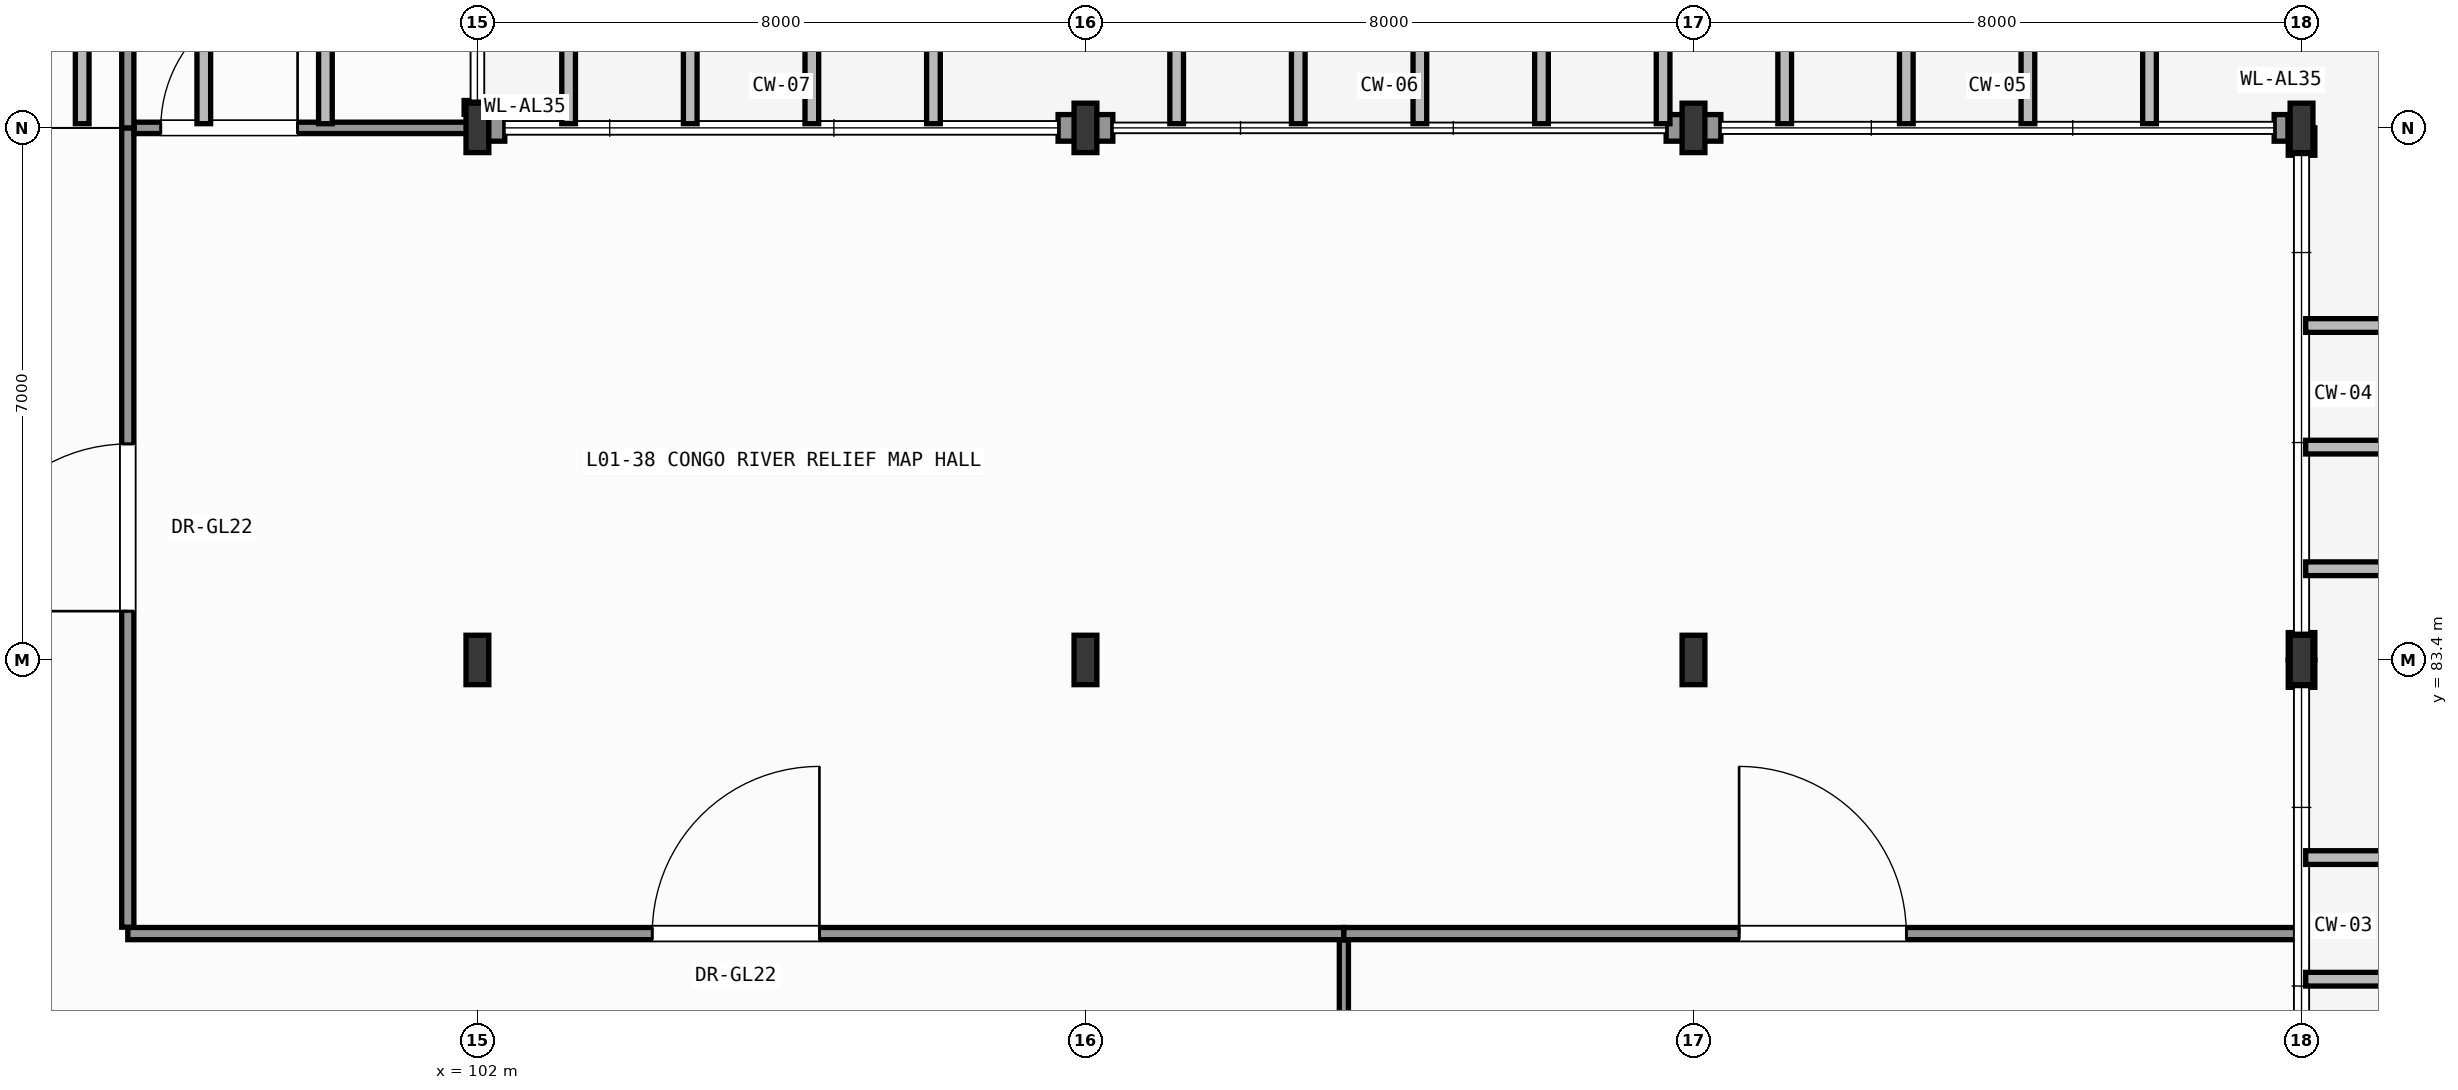
"""IFC4 building model, lengths in metres.
Left out: names, types, materials, properties, quantities, classifications, styles, units other than length and angle.
Written with IfcOpenShell. Run it as: python <this file> out.ifc"""

import sys

from ifc_helpers import new_model, si_unit, direction, frame, frame_2d, origin, origin_2d, place, context, subcontext, project, spatial, rectangle, i_section, extrude, element, fill, save


model = new_model("IFC4")
c1 = context("Model", 3, precision=1e-05, world=origin(), true_north=direction((0.0, 1.0)))
c2 = subcontext(c1, "Body", "Model", "MODEL_VIEW")
j1 = project(units=[si_unit("LENGTHUNIT", "METRE"), si_unit("PLANEANGLEUNIT", "RADIAN")], contexts=[c1])
p1 = place(None, origin())
s1 = spatial("IfcSite", under=j1, at=p1, CompositionType="ELEMENT")
p2 = place(p1, origin())
s2 = spatial("IfcBuilding", under=s1, at=p2, CompositionType="ELEMENT")
p3 = place(p2, origin())
s3 = spatial("IfcBuildingStorey", under=s2, at=p3, CompositionType="ELEMENT", Elevation=0.0)
for number, where, z_axis, x_axis in (
    (1, (102.0, 83.4, 0.0), (0.0, 0.0, 1.0), (1.0, 0.0, 0.0)),
    (2, (102.0, 90.4, 0.0), (0.0, 0.0, 1.0), (1.0, 0.0, 0.0)),
    (3, (110.0, 83.4, 0.0), (0.0, 0.0, 1.0), (1.0, 0.0, 0.0)),
    (4, (110.0, 90.4, 0.0), (0.0, 0.0, 1.0), (1.0, 0.0, 0.0)),
    (5, (118.0, 83.4, 0.0), (0.0, 0.0, 1.0), (1.0, 0.0, 0.0)),
    (6, (118.0, 90.4, 0.0), (0.0, 0.0, 1.0), (1.0, 0.0, 0.0)),
    (7, (126.0, 83.4, 0.0), (0.0, 0.0, 1.0), (1.0, 0.0, 0.0)),
    (8, (126.0, 90.4, 0.0), (0.0, 0.0, 1.0), (1.0, 0.0, 0.0)),
):
    element("IfcColumn", number, at=place(p3, frame(where, z_axis=z_axis, x_axis=x_axis)), inside=s3, PredefinedType="COLUMN", context=c2, shape_type="SweptSolid", body=[
        extrude(i_section(OverallWidth=0.3, OverallDepth=0.65, WebThickness=0.016, FlangeThickness=0.031, FilletRadius=0.027, at=origin_2d()), origin(), (0.0, 0.0, 1.0), 7.8),
    ])
p4 = place(p3, frame((126.0, 83.04, 0.0), z_axis=(0.0, 0.0, 1.0), x_axis=(0.0, 1.0, 0.0)))
e9 = element("IfcWall", 9, at=p4, inside=s3, PredefinedType="SOLIDWALL", context=c2, shape_type="SweptSolid", body=[
    extrude(rectangle(XDim=0.36, YDim=0.35, at=frame_2d((0.18, 0.0))), origin(), (0.0, 0.0, 1.0), 7.235),
])
p5 = place(p3, frame((126.0, 83.4, 0.0), z_axis=(0.0, 0.0, 1.0), x_axis=(0.0, 1.0, 0.0)))
e10 = element("IfcWall", 10, at=p5, inside=s3, PredefinedType="SOLIDWALL", context=c2, shape_type="SweptSolid", body=[
    extrude(rectangle(XDim=0.36, YDim=0.35, at=frame_2d((0.18, 0.0))), origin(), (0.0, 0.0, 1.0), 7.235),
])
p6 = place(p3, frame((126.0, 90.04, 0.0), z_axis=(0.0, 0.0, 1.0), x_axis=(0.0, 1.0, 0.0)))
e11 = element("IfcWall", 11, at=p6, inside=s3, PredefinedType="SOLIDWALL", context=c2, shape_type="SweptSolid", body=[
    extrude(rectangle(XDim=0.36, YDim=0.35, at=frame_2d((0.18, 0.0))), origin(), (0.0, 0.0, 1.0), 7.235),
])
p7 = place(p3, frame((125.821, 90.4, 0.0), z_axis=(0.0, 0.0, 1.0), x_axis=(-1.0, 0.0, 0.0)))
e12 = element("IfcWall", 12, at=p7, inside=s3, PredefinedType="SOLIDWALL", context=c2, shape_type="SweptSolid", body=[
    extrude(rectangle(XDim=0.181, YDim=0.35, at=frame_2d((0.091, 0.0))), origin(), (0.0, 0.0, 1.0), 7.54),
])
for number, where, z_axis, x_axis in (
    (13, (118.36, 90.4, 0.0), (0.0, 0.0, 1.0), (-1.0, 0.0, 0.0)),
    (14, (118.0, 90.4, 0.0), (0.0, 0.0, 1.0), (-1.0, 0.0, 0.0)),
    (15, (110.36, 90.4, 0.0), (0.0, 0.0, 1.0), (-1.0, 0.0, 0.0)),
    (16, (110.0, 90.4, 0.0), (0.0, 0.0, 1.0), (-1.0, 0.0, 0.0)),
    (17, (102.36, 90.4, 0.0), (0.0, 0.0, 1.0), (-1.0, 0.0, 0.0)),
):
    element("IfcWall", number, at=place(p3, frame(where, z_axis=z_axis, x_axis=x_axis)), inside=s3, PredefinedType="SOLIDWALL", context=c2, shape_type="SweptSolid", body=[
        extrude(rectangle(XDim=0.36, YDim=0.35, at=frame_2d((0.18, 0.0))), origin(), (0.0, 0.0, 1.0), 7.135),
    ])
p8 = place(p3, frame((102.0, 90.579, 0.0), z_axis=(0.0, 0.0, 1.0), x_axis=(0.0, 1.0, 0.0)))
e18 = element("IfcWall", 18, at=p8, inside=s3, PredefinedType="SOLIDWALL", context=c2, shape_type="SweptSolid", body=[
    extrude(rectangle(XDim=0.181, YDim=0.35, at=frame_2d((0.09, 0.0))), origin(), (0.0, 0.0, 1.0), 7.54),
])
p9 = place(p3, frame((97.4, 79.8, 0.0), z_axis=(0.0, 0.0, 1.0), x_axis=(1.0, 0.0, 0.0)))
e19 = element("IfcWall", 19, at=p9, inside=s3, PredefinedType="PARTITIONING", context=c2, shape_type="SweptSolid", body=[
    extrude(rectangle(XDim=16.0, YDim=0.16, at=frame_2d((8.0, 0.0))), origin(), (0.0, 0.0, 1.0), 7.165),
])
p10 = place(p9, frame((6.9, 0.0, 0.0)))
e20 = element("IfcOpeningElement", 20, at=p10, cuts=e19, PredefinedType="OPENING", context=c2, shape_type="SweptSolid", body=[
    extrude(rectangle(XDim=2.2, YDim=2.6, at=frame_2d((1.1, 1.3))), frame((0.0, 0.09, 0.0), z_axis=(0.0, -1.0, 0.0), x_axis=(1.0, 0.0, 0.0)), (0.0, 0.0, 1.0), 0.18),
])
p11 = place(p3, frame((113.4, 76.4, 0.0), z_axis=(0.0, 0.0, 1.0), x_axis=(0.0, 1.0, 0.0)))
e21 = element("IfcWall", 21, at=p11, inside=s3, PredefinedType="PARTITIONING", context=c2, shape_type="SweptSolid", body=[
    extrude(rectangle(XDim=3.316, YDim=0.12, at=frame_2d((1.658, 0.0))), origin(), (0.0, 0.0, 1.0), 7.54),
])
p12 = place(p11, frame((1.158, 0.0, 0.0)))
e22 = element("IfcOpeningElement", 22, at=p12, cuts=e21, PredefinedType="OPENING", context=c2, shape_type="SweptSolid", body=[
    extrude(rectangle(XDim=1.0, YDim=2.15, at=frame_2d((0.5, 1.075))), frame((0.0, 0.07, 0.0), z_axis=(0.0, -1.0, 0.0), x_axis=(1.0, 0.0, 0.0)), (0.0, 0.0, 1.0), 0.14),
])
p13 = place(p3, frame((97.4, 79.884, 0.0), z_axis=(0.0, 0.0, 1.0), x_axis=(0.0, 1.0, 0.0)))
e23 = element("IfcWall", 23, at=p13, inside=s3, PredefinedType="PARTITIONING", context=c2, shape_type="SweptSolid", body=[
    extrude(rectangle(XDim=10.516, YDim=0.16, at=frame_2d((5.258, 0.0))), origin(), (0.0, 0.0, 1.0), 7.54),
])
p14 = place(p13, frame((4.158, 0.0, 0.0)))
e24 = element("IfcOpeningElement", 24, at=p14, cuts=e23, PredefinedType="OPENING", context=c2, shape_type="SweptSolid", body=[
    extrude(rectangle(XDim=2.2, YDim=2.6, at=frame_2d((1.1, 1.3))), frame((0.0, 0.09, 0.0), z_axis=(0.0, -1.0, 0.0), x_axis=(1.0, 0.0, 0.0)), (0.0, 0.0, 1.0), 0.18),
])
p15 = place(p3, frame((113.4, 79.8, 0.0), z_axis=(0.0, 0.0, 1.0), x_axis=(1.0, 0.0, 0.0)))
e25 = element("IfcWall", 25, at=p15, inside=s3, PredefinedType="PARTITIONING", context=c2, shape_type="SweptSolid", body=[
    extrude(rectangle(XDim=12.6, YDim=0.16, at=frame_2d((6.3, 0.0))), origin(), (0.0, 0.0, 1.0), 7.165),
])
p16 = place(p15, frame((5.2, 0.0, 0.0)))
e26 = element("IfcOpeningElement", 26, at=p16, cuts=e25, PredefinedType="OPENING", context=c2, shape_type="SweptSolid", body=[
    extrude(rectangle(XDim=2.2, YDim=2.6, at=frame_2d((1.1, 1.3))), frame((0.0, 0.09, 0.0), z_axis=(0.0, -1.0, 0.0), x_axis=(1.0, 0.0, 0.0)), (0.0, 0.0, 1.0), 0.18),
])
p17 = place(p3, frame((97.484, 90.4, 0.0), z_axis=(0.0, 0.0, 1.0), x_axis=(1.0, 0.0, 0.0)))
e27 = element("IfcWall", 27, at=p17, inside=s3, PredefinedType="PARTITIONING", context=c2, shape_type="SweptSolid", body=[
    extrude(rectangle(XDim=4.516, YDim=0.15, at=frame_2d((2.258, 0.0))), origin(), (0.0, 0.0, 1.0), 7.135),
])
p18 = place(p17, frame((0.35, 0.0, 0.0)))
e28 = element("IfcOpeningElement", 28, at=p18, cuts=e27, PredefinedType="OPENING", context=c2, shape_type="SweptSolid", body=[
    extrude(rectangle(XDim=1.8, YDim=2.4, at=frame_2d((0.9, 1.2))), frame((0.0, 0.085, 0.0), z_axis=(0.0, -1.0, 0.0), x_axis=(1.0, 0.0, 0.0)), (0.0, 0.0, 1.0), 0.17),
])
p19 = place(p3, frame((97.4, 90.4, 0.0), z_axis=(0.0, 0.0, 1.0), x_axis=(0.0, 1.0, 0.0)))
e29 = element("IfcWall", 29, at=p19, inside=s3, PredefinedType="PARTITIONING", context=c2, shape_type="SweptSolid", body=[
    extrude(rectangle(XDim=30.4, YDim=0.16, at=frame_2d((15.2, 0.0))), origin(), (0.0, 0.0, 1.0), 7.54),
])
p20 = place(p19, frame((14.1, 0.0, 0.0)))
e30 = element("IfcOpeningElement", 30, at=p20, cuts=e29, PredefinedType="OPENING", context=c2, shape_type="SweptSolid", body=[
    extrude(rectangle(XDim=2.2, YDim=2.6, at=frame_2d((1.1, 1.3))), frame((0.0, 0.09, 0.0), z_axis=(0.0, -1.0, 0.0), x_axis=(1.0, 0.0, 0.0)), (0.0, 0.0, 1.0), 0.18),
])
p21 = place(p10, origin())
e31 = element("IfcDoor", 31, at=p21, inside=s3, OperationType="SINGLE_SWING_RIGHT", PredefinedType="DOOR", context=c2, shape_type="SweptSolid", body=[
    extrude(rectangle(XDim=2.2, YDim=2.6, at=frame_2d((1.1, 1.3))), frame((0.0, 0.025, 0.0), z_axis=(0.0, -1.0, 0.0), x_axis=(1.0, 0.0, 0.0)), (0.0, 0.0, 1.0), 0.05),
])
fill(e20, e31)
p22 = place(p14, origin())
e32 = element("IfcDoor", 32, at=p22, inside=s3, OperationType="SINGLE_SWING_LEFT", PredefinedType="DOOR", context=c2, shape_type="SweptSolid", body=[
    extrude(rectangle(XDim=2.2, YDim=2.6, at=frame_2d((1.1, 1.3))), frame((0.0, 0.025, 0.0), z_axis=(0.0, -1.0, 0.0), x_axis=(1.0, 0.0, 0.0)), (0.0, 0.0, 1.0), 0.05),
])
fill(e24, e32)
p23 = place(p16, origin())
e33 = element("IfcDoor", 33, at=p23, inside=s3, OperationType="SINGLE_SWING_LEFT", PredefinedType="DOOR", context=c2, shape_type="SweptSolid", body=[
    extrude(rectangle(XDim=2.2, YDim=2.6, at=frame_2d((1.1, 1.3))), frame((0.0, 0.025, 0.0), z_axis=(0.0, -1.0, 0.0), x_axis=(1.0, 0.0, 0.0)), (0.0, 0.0, 1.0), 0.05),
])
fill(e26, e33)
p24 = place(p18, origin())
e34 = element("IfcDoor", 34, at=p24, inside=s3, OperationType="SINGLE_SWING_RIGHT", PredefinedType="DOOR", context=c2, shape_type="SweptSolid", body=[
    extrude(rectangle(XDim=1.8, YDim=2.4, at=frame_2d((0.9, 1.2))), frame((0.0, 0.025, 0.0), z_axis=(0.0, -1.0, 0.0), x_axis=(1.0, 0.0, 0.0)), (0.0, 0.0, 1.0), 0.05),
])
fill(e28, e34)
save(model, sys.argv[1])
